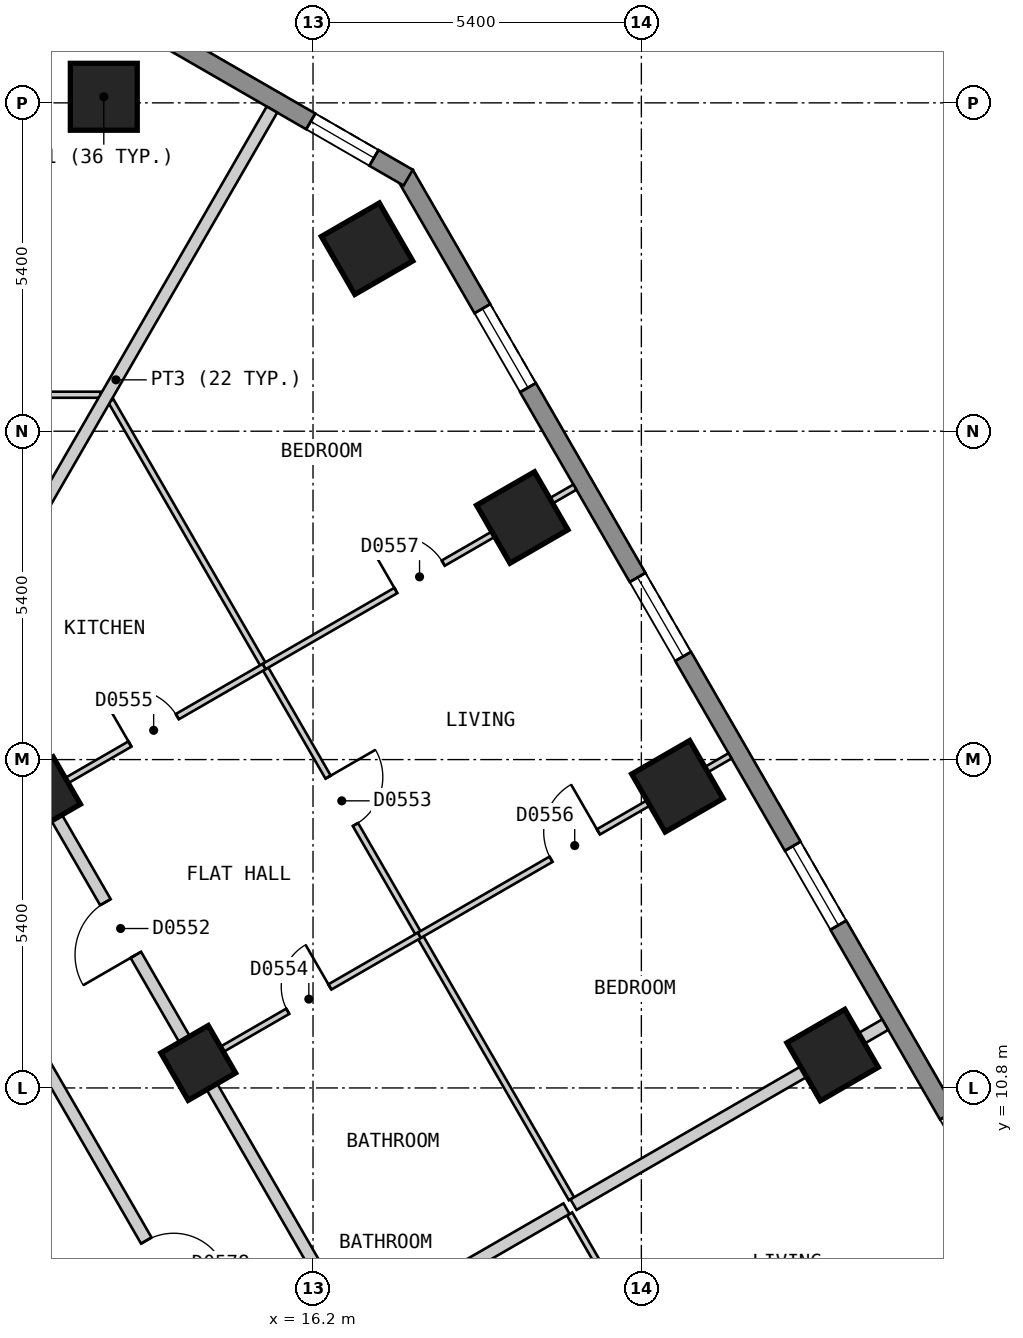
"""IFC4 building model, lengths in metres.
Left out: names, types, materials, properties, quantities, classifications, styles, units other than length and angle.
Written with IfcOpenShell. Run it as: python <this file> out.ifc"""

import sys

from ifc_helpers import new_model, si_unit, direction, frame, frame_2d, origin, origin_2d, place, context, subcontext, project, spatial, polyline, rectangle, outline, extrude, element, fill, save


model = new_model("IFC4")
c1 = context("Model", 3, precision=1e-05, world=origin(), true_north=direction((0.0, 1.0)))
c2 = subcontext(c1, "Body", "Model", "MODEL_VIEW")
j1 = project(units=[si_unit("LENGTHUNIT", "METRE"), si_unit("PLANEANGLEUNIT", "RADIAN")], contexts=[c1])
p1 = place(None, origin())
s1 = spatial("IfcSite", under=j1, at=p1, CompositionType="ELEMENT")
p2 = place(p1, origin())
s2 = spatial("IfcBuilding", under=s1, at=p2, CompositionType="ELEMENT")
p3 = place(p2, frame((0.0, 0.0, 44.4)))
s3 = spatial("IfcBuildingStorey", under=s2, at=p3, CompositionType="ELEMENT", Elevation=44.4)
for number, where, z_axis, x_axis in (
    (1, (12.759, 27.1, 0.0), (0.0, 0.0, 1.0), (-1.0, 0.0, 0.0)),
    (2, (24.745, 11.341, 0.0), (0.0, 0.0, 1.0), (-0.5, 0.866, 0.0)),
    (3, (22.193, 15.761, 0.0), (0.0, 0.0, 1.0), (-0.5, 0.866, 0.0)),
    (4, (19.641, 20.181, 0.0), (0.0, 0.0, 1.0), (-0.5, 0.866, 0.0)),
    (5, (17.089, 24.601, 0.0), (0.0, 0.0, 1.0), (-0.5, 0.866, 0.0)),
):
    element("IfcColumn", number, at=place(p3, frame(where, z_axis=z_axis, x_axis=x_axis)), inside=s3, PredefinedType="COLUMN", context=c2, shape_type="SweptSolid", body=[
        extrude(rectangle(XDim=1.1, YDim=1.1, at=origin_2d()), origin(), (0.0, 0.0, 1.0), 3.0),
    ])
for number, where, z_axis, x_axis in (
    (6, (14.312, 11.211, 0.0), (0.0, 0.0, 1.0), (-0.5, 0.866, 0.0)),
    (7, (11.76, 15.631, 0.0), (0.0, 0.0, 1.0), (-0.5, 0.866, 0.0)),
):
    element("IfcColumn", number, at=place(p3, frame(where, z_axis=z_axis, x_axis=x_axis)), inside=s3, PredefinedType="COLUMN", context=c2, shape_type="SweptSolid", body=[
        extrude(rectangle(XDim=0.9, YDim=0.9, at=origin_2d()), origin(), (0.0, 0.0, 1.0), 3.0),
    ])
p4 = place(p3, frame((31.22, 2.425, 0.0), z_axis=(0.0, 0.0, 1.0), x_axis=(-0.500001938803, 0.866024284413, 0.0)))
e8 = element("IfcWall", 8, at=p4, inside=s3, PredefinedType="SOLIDWALL", context=c2, shape_type="SweptSolid", body=[
    extrude(outline(polyline([(0.0, -0.15), (27.02, -0.15), (26.94, 0.15), (0.08, 0.15), (0.0, -0.15)])), origin(), (0.0, 0.0, 1.0), 2.7),
])
p5 = place(p4, frame((2.553, 0.0, 0.15)))
e9 = element("IfcOpeningElement", 9, at=p5, cuts=e8, PredefinedType="OPENING", context=c2, shape_type="SweptSolid", body=[
    extrude(rectangle(XDim=1.5, YDim=2.1, at=frame_2d((0.75, 1.05))), frame((0.0, 0.16, 0.0), z_axis=(0.0, -1.0, 0.0), x_axis=(1.0, 0.0, 0.0)), (0.0, 0.0, 1.0), 0.32),
])
p6 = place(p4, frame((7.657, 0.0, 0.15)))
e10 = element("IfcOpeningElement", 10, at=p6, cuts=e8, PredefinedType="OPENING", context=c2, shape_type="SweptSolid", body=[
    extrude(rectangle(XDim=1.5, YDim=2.1, at=frame_2d((0.75, 1.05))), frame((0.0, 0.16, 0.0), z_axis=(0.0, -1.0, 0.0), x_axis=(1.0, 0.0, 0.0)), (0.0, 0.0, 1.0), 0.32),
])
p7 = place(p4, frame((12.761, 0.0, 0.15)))
e11 = element("IfcOpeningElement", 11, at=p7, cuts=e8, PredefinedType="OPENING", context=c2, shape_type="SweptSolid", body=[
    extrude(rectangle(XDim=1.5, YDim=2.1, at=frame_2d((0.75, 1.05))), frame((0.0, 0.16, 0.0), z_axis=(0.0, -1.0, 0.0), x_axis=(1.0, 0.0, 0.0)), (0.0, 0.0, 1.0), 0.32),
])
p8 = place(p4, frame((17.865, 0.0, 0.15)))
e12 = element("IfcOpeningElement", 12, at=p8, cuts=e8, PredefinedType="OPENING", context=c2, shape_type="SweptSolid", body=[
    extrude(rectangle(XDim=1.5, YDim=2.1, at=frame_2d((0.75, 1.05))), frame((0.0, 0.16, 0.0), z_axis=(0.0, -1.0, 0.0), x_axis=(1.0, 0.0, 0.0)), (0.0, 0.0, 1.0), 0.32),
])
p9 = place(p4, frame((22.969, 0.0, 0.15)))
e13 = element("IfcOpeningElement", 13, at=p9, cuts=e8, PredefinedType="OPENING", context=c2, shape_type="SweptSolid", body=[
    extrude(rectangle(XDim=1.5, YDim=2.1, at=frame_2d((0.75, 1.05))), frame((0.0, 0.16, 0.0), z_axis=(0.0, -1.0, 0.0), x_axis=(1.0, 0.0, 0.0)), (0.0, 0.0, 1.0), 0.32),
])
p10 = place(p3, frame((17.765, 25.77, 0.0), z_axis=(0.0, 0.0, 1.0), x_axis=(-0.866010750942, 0.50002537861, 0.0)))
e14 = element("IfcWall", 14, at=p10, inside=s3, PredefinedType="SOLIDWALL", context=c2, shape_type="SweptSolid", body=[
    extrude(outline(polyline([(0.0, -0.15), (5.0, -0.15), (4.919, 0.15), (0.08, 0.15), (0.0, -0.15)])), origin(), (0.0, 0.0, 1.0), 2.7),
])
p11 = place(p10, frame((0.65, 0.0, 0.15)))
e15 = element("IfcOpeningElement", 15, at=p11, cuts=e14, PredefinedType="OPENING", context=c2, shape_type="SweptSolid", body=[
    extrude(rectangle(XDim=1.2, YDim=2.1, at=frame_2d((0.6, 1.05))), frame((0.0, 0.16, 0.0), z_axis=(0.0, -1.0, 0.0), x_axis=(1.0, 0.0, 0.0)), (0.0, 0.0, 1.0), 0.32),
])
p12 = place(p3, frame((9.18, 15.7, 0.0), z_axis=(0.0, 0.0, 1.0), x_axis=(0.500003652032, -0.866023295272, 0.0)))
e16 = element("IfcWall", 16, at=p12, inside=s3, PredefinedType="PARTITIONING", context=c2, shape_type="SweptSolid", body=[
    extrude(rectangle(XDim=18.012, YDim=0.2, at=frame_2d((9.006, 0.0))), origin(), (0.0, 0.0, 1.0), 2.7),
])
p13 = place(p12, frame((8.556, 0.0, 0.0)))
e17 = element("IfcOpeningElement", 17, at=p13, cuts=e16, PredefinedType="OPENING", context=c2, shape_type="SweptSolid", body=[
    extrude(rectangle(XDim=0.9, YDim=2.1, at=frame_2d((0.45, 1.05))), frame((0.0, 0.11, 0.0), z_axis=(0.0, -1.0, 0.0), x_axis=(1.0, 0.0, 0.0)), (0.0, 0.0, 1.0), 0.22),
])
p14 = place(p3, frame((10.45, 17.9, 0.0), z_axis=(0.0, 0.0, 1.0), x_axis=(0.500034352617, -0.866005569383, 0.0)))
e18 = element("IfcWall", 18, at=p14, inside=s3, PredefinedType="PARTITIONING", context=c2, shape_type="SweptSolid", body=[
    extrude(rectangle(XDim=20.553, YDim=0.2, at=frame_2d((10.276, 0.0))), origin(), (0.0, 0.0, 1.0), 2.7),
])
p15 = place(p14, frame((14.902, 0.0, 0.0)))
e19 = element("IfcOpeningElement", 19, at=p15, cuts=e18, PredefinedType="OPENING", context=c2, shape_type="SweptSolid", body=[
    extrude(rectangle(XDim=1.0, YDim=2.1, at=frame_2d((0.5, 1.05))), frame((0.0, 0.11, 0.0), z_axis=(0.0, -1.0, 0.0), x_axis=(1.0, 0.0, 0.0)), (0.0, 0.0, 1.0), 0.22),
])
p16 = place(p14, frame((4.671, 0.0, 0.0)))
e20 = element("IfcOpeningElement", 20, at=p16, cuts=e18, PredefinedType="OPENING", context=c2, shape_type="SweptSolid", body=[
    extrude(rectangle(XDim=1.0, YDim=2.1, at=frame_2d((0.5, 1.05))), frame((0.0, 0.11, 0.0), z_axis=(0.0, -1.0, 0.0), x_axis=(1.0, 0.0, 0.0)), (0.0, 0.0, 1.0), 0.22),
])
p17 = place(p3, frame((20.419, 8.728, 0.0), z_axis=(0.0, 0.0, 1.0), x_axis=(0.499958946799, -0.866049104564, 0.0)))
e21 = element("IfcWall", 21, at=p17, inside=s3, PredefinedType="PARTITIONING", context=c2, shape_type="SweptSolid", body=[
    extrude(rectangle(XDim=5.004, YDim=0.1, at=frame_2d((2.502, 0.0))), origin(), (0.0, 0.0, 1.0), 2.7),
])
p18 = place(p17, frame((1.978, 0.0, 0.0)))
e22 = element("IfcOpeningElement", 22, at=p18, cuts=e21, PredefinedType="OPENING", context=c2, shape_type="SweptSolid", body=[
    extrude(rectangle(XDim=0.9, YDim=2.1, at=frame_2d((0.45, 1.05))), frame((0.0, 0.06, 0.0), z_axis=(0.0, -1.0, 0.0), x_axis=(1.0, 0.0, 0.0)), (0.0, 0.0, 1.0), 0.12),
])
p19 = place(p3, frame((12.875, 22.1, 0.0), z_axis=(0.0, 0.0, 1.0), x_axis=(0.499994897061, -0.866028349948, 0.0)))
e23 = element("IfcWall", 23, at=p19, inside=s3, PredefinedType="PARTITIONING", context=c2, shape_type="SweptSolid", body=[
    extrude(rectangle(XDim=15.152, YDim=0.1, at=frame_2d((7.576, 0.0))), origin(), (0.0, 0.0, 1.0), 2.7),
])
p20 = place(p19, frame((7.146, 0.0, 0.0)))
e24 = element("IfcOpeningElement", 24, at=p20, cuts=e23, PredefinedType="OPENING", context=c2, shape_type="SweptSolid", body=[
    extrude(rectangle(XDim=0.9, YDim=2.1, at=frame_2d((0.45, 1.05))), frame((0.0, 0.06, 0.0), z_axis=(0.0, -1.0, 0.0), x_axis=(1.0, 0.0, 0.0)), (0.0, 0.0, 1.0), 0.12),
])
p21 = place(p3, frame((-2.453, 22.2, 0.0), z_axis=(0.0, 0.0, 1.0), x_axis=(1.0, 0.0, 0.0)))
e25 = element("IfcWall", 25, at=p21, inside=s3, PredefinedType="PARTITIONING", context=c2, shape_type="SweptSolid", body=[
    extrude(rectangle(XDim=15.155, YDim=0.1, at=frame_2d((7.577, 0.0))), origin(), (0.0, 0.0, 1.0), 2.7),
])
p22 = place(p21, frame((7.106, 0.0, 0.0)))
e26 = element("IfcOpeningElement", 26, at=p22, cuts=e25, PredefinedType="OPENING", context=c2, shape_type="SweptSolid", body=[
    extrude(rectangle(XDim=0.9, YDim=2.1, at=frame_2d((0.45, 1.05))), frame((0.0, 0.06, 0.0), z_axis=(0.0, -1.0, 0.0), x_axis=(1.0, 0.0, 0.0)), (0.0, 0.0, 1.0), 0.12),
])
p23 = place(p3, frame((11.847, 15.681, 0.0), z_axis=(0.0, 0.0, 1.0), x_axis=(0.865980278416, 0.500078151287, 0.0)))
e27 = element("IfcWall", 27, at=p23, inside=s3, PredefinedType="PARTITIONING", context=c2, shape_type="SweptSolid", body=[
    extrude(rectangle(XDim=4.099, YDim=0.1, at=frame_2d((2.05, 0.0))), origin(), (0.0, 0.0, 1.0), 2.7),
])
p24 = place(p23, frame((1.55, 0.0, 0.0)))
e28 = element("IfcOpeningElement", 28, at=p24, cuts=e27, PredefinedType="OPENING", context=c2, shape_type="SweptSolid", body=[
    extrude(rectangle(XDim=0.9, YDim=2.1, at=frame_2d((0.45, 1.05))), frame((0.0, 0.06, 0.0), z_axis=(0.0, -1.0, 0.0), x_axis=(1.0, 0.0, 0.0)), (0.0, 0.0, 1.0), 0.12),
])
p25 = place(p3, frame((14.399, 11.261, 0.0), z_axis=(0.0, 0.0, 1.0), x_axis=(0.865980278416, 0.500078151287, 0.0)))
e29 = element("IfcWall", 29, at=p25, inside=s3, PredefinedType="PARTITIONING", context=c2, shape_type="SweptSolid", body=[
    extrude(rectangle(XDim=4.099, YDim=0.1, at=frame_2d((2.05, 0.0))), origin(), (0.0, 0.0, 1.0), 2.7),
])
p26 = place(p25, frame((1.6, 0.0, 0.0)))
e30 = element("IfcOpeningElement", 30, at=p26, cuts=e29, PredefinedType="OPENING", context=c2, shape_type="SweptSolid", body=[
    extrude(rectangle(XDim=0.8, YDim=2.1, at=frame_2d((0.4, 1.05))), frame((0.0, 0.06, 0.0), z_axis=(0.0, -1.0, 0.0), x_axis=(1.0, 0.0, 0.0)), (0.0, 0.0, 1.0), 0.12),
])
p27 = place(p3, frame((10.393, 18.0, 0.0), z_axis=(0.0, 0.0, 1.0), x_axis=(0.499945497007, 0.866056868816, 0.0)))
e31 = element("IfcWall", 31, at=p27, inside=s3, PredefinedType="PARTITIONING", context=c2, shape_type="SweptSolid", body=[
    extrude(rectangle(XDim=10.265, YDim=0.2, at=frame_2d((5.132, 0.0))), origin(), (0.0, 0.0, 1.0), 2.7),
])
p28 = place(p3, frame((16.95, 6.841, 0.0), z_axis=(0.0, 0.0, 1.0), x_axis=(0.866031112038, 0.499990112884, 0.0)))
e32 = element("IfcWall", 32, at=p28, inside=s3, PredefinedType="PARTITIONING", context=c2, shape_type="SweptSolid", body=[
    extrude(rectangle(XDim=3.948, YDim=0.2, at=frame_2d((1.974, 0.0))), origin(), (0.0, 0.0, 1.0), 2.7),
])
p29 = place(p3, frame((20.484, 8.881, 0.0), z_axis=(0.0, 0.0, 1.0), x_axis=(0.866000821391, 0.500042575537, 0.0)))
e33 = element("IfcWall", 33, at=p29, inside=s3, PredefinedType="PARTITIONING", context=c2, shape_type="SweptSolid", body=[
    extrude(rectangle(XDim=5.919, YDim=0.2, at=frame_2d((2.96, 0.0))), origin(), (0.0, 0.0, 1.0), 2.7),
])
p30 = place(p3, frame((15.397, 17.731, 0.0), z_axis=(0.0, 0.0, 1.0), x_axis=(0.866052608538, 0.499952877023, 0.0)))
e34 = element("IfcWall", 34, at=p30, inside=s3, PredefinedType="PARTITIONING", context=c2, shape_type="SweptSolid", body=[
    extrude(rectangle(XDim=5.9, YDim=0.1, at=frame_2d((2.95, 0.0))), origin(), (0.0, 0.0, 1.0), 2.7),
])
p31 = place(p30, frame((2.5, 0.0, 0.0)))
e35 = element("IfcOpeningElement", 35, at=p31, cuts=e34, PredefinedType="OPENING", context=c2, shape_type="SweptSolid", body=[
    extrude(rectangle(XDim=0.9, YDim=2.1, at=frame_2d((0.45, 1.05))), frame((0.0, 0.06, 0.0), z_axis=(0.0, -1.0, 0.0), x_axis=(1.0, 0.0, 0.0)), (0.0, 0.0, 1.0), 0.12),
])
p32 = place(p3, frame((17.949, 13.311, 0.0), z_axis=(0.0, 0.0, 1.0), x_axis=(0.866052608538, 0.499952877023, 0.0)))
e36 = element("IfcWall", 36, at=p32, inside=s3, PredefinedType="PARTITIONING", context=c2, shape_type="SweptSolid", body=[
    extrude(rectangle(XDim=5.9, YDim=0.1, at=frame_2d((2.95, 0.0))), origin(), (0.0, 0.0, 1.0), 2.7),
])
p33 = place(p32, frame((2.5, 0.0, 0.0)))
e37 = element("IfcOpeningElement", 37, at=p33, cuts=e36, PredefinedType="OPENING", context=c2, shape_type="SweptSolid", body=[
    extrude(rectangle(XDim=0.9, YDim=2.1, at=frame_2d((0.45, 1.05))), frame((0.0, 0.06, 0.0), z_axis=(0.0, -1.0, 0.0), x_axis=(1.0, 0.0, 0.0)), (0.0, 0.0, 1.0), 0.12),
])
p34 = place(p7, origin())
e38 = element("IfcWindow", 38, at=p34, inside=s3, PartitioningType="SINGLE_PANEL", PredefinedType="WINDOW", context=c2, shape_type="SweptSolid", body=[
    extrude(rectangle(XDim=1.5, YDim=2.1, at=frame_2d((0.75, 1.05))), frame((0.0, 0.03, 0.0), z_axis=(0.0, -1.0, 0.0), x_axis=(1.0, 0.0, 0.0)), (0.0, 0.0, 1.0), 0.06),
])
fill(e11, e38)
p35 = place(p8, origin())
e39 = element("IfcWindow", 39, at=p35, inside=s3, PartitioningType="SINGLE_PANEL", PredefinedType="WINDOW", context=c2, shape_type="SweptSolid", body=[
    extrude(rectangle(XDim=1.5, YDim=2.1, at=frame_2d((0.75, 1.05))), frame((0.0, 0.03, 0.0), z_axis=(0.0, -1.0, 0.0), x_axis=(1.0, 0.0, 0.0)), (0.0, 0.0, 1.0), 0.06),
])
fill(e12, e39)
p36 = place(p9, origin())
e40 = element("IfcWindow", 40, at=p36, inside=s3, PartitioningType="SINGLE_PANEL", PredefinedType="WINDOW", context=c2, shape_type="SweptSolid", body=[
    extrude(rectangle(XDim=1.5, YDim=2.1, at=frame_2d((0.75, 1.05))), frame((0.0, 0.03, 0.0), z_axis=(0.0, -1.0, 0.0), x_axis=(1.0, 0.0, 0.0)), (0.0, 0.0, 1.0), 0.06),
])
fill(e13, e40)
p37 = place(p11, origin())
e41 = element("IfcWindow", 41, at=p37, inside=s3, PartitioningType="SINGLE_PANEL", PredefinedType="WINDOW", context=c2, shape_type="SweptSolid", body=[
    extrude(rectangle(XDim=1.2, YDim=2.1, at=frame_2d((0.6, 1.05))), frame((0.0, 0.03, 0.0), z_axis=(0.0, -1.0, 0.0), x_axis=(1.0, 0.0, 0.0)), (0.0, 0.0, 1.0), 0.06),
])
fill(e15, e41)
p38 = place(p16, origin())
e42 = element("IfcDoor", 42, at=p38, inside=s3, OperationType="SINGLE_SWING_RIGHT", PredefinedType="DOOR", context=c2, shape_type="SweptSolid", body=[
    extrude(rectangle(XDim=1.0, YDim=2.1, at=frame_2d((0.5, 1.05))), frame((0.0, 0.025, 0.0), z_axis=(0.0, -1.0, 0.0), x_axis=(1.0, 0.0, 0.0)), (0.0, 0.0, 1.0), 0.05),
])
fill(e20, e42)
p39 = place(p20, origin())
e43 = element("IfcDoor", 43, at=p39, inside=s3, OperationType="SINGLE_SWING_LEFT", PredefinedType="DOOR", context=c2, shape_type="SweptSolid", body=[
    extrude(rectangle(XDim=0.9, YDim=2.1, at=frame_2d((0.45, 1.05))), frame((0.0, 0.025, 0.0), z_axis=(0.0, -1.0, 0.0), x_axis=(1.0, 0.0, 0.0)), (0.0, 0.0, 1.0), 0.05),
])
fill(e24, e43)
p40 = place(p26, origin())
e44 = element("IfcDoor", 44, at=p40, inside=s3, OperationType="SINGLE_SWING_RIGHT", PredefinedType="DOOR", context=c2, shape_type="SweptSolid", body=[
    extrude(rectangle(XDim=0.8, YDim=2.1, at=frame_2d((0.4, 1.05))), frame((0.0, 0.025, 0.0), z_axis=(0.0, -1.0, 0.0), x_axis=(1.0, 0.0, 0.0)), (0.0, 0.0, 1.0), 0.05),
])
fill(e30, e44)
p41 = place(p24, origin())
e45 = element("IfcDoor", 45, at=p41, inside=s3, OperationType="SINGLE_SWING_LEFT", PredefinedType="DOOR", context=c2, shape_type="SweptSolid", body=[
    extrude(rectangle(XDim=0.9, YDim=2.1, at=frame_2d((0.45, 1.05))), frame((0.0, 0.025, 0.0), z_axis=(0.0, -1.0, 0.0), x_axis=(1.0, 0.0, 0.0)), (0.0, 0.0, 1.0), 0.05),
])
fill(e28, e45)
p42 = place(p33, origin())
e46 = element("IfcDoor", 46, at=p42, inside=s3, OperationType="SINGLE_SWING_RIGHT", PredefinedType="DOOR", context=c2, shape_type="SweptSolid", body=[
    extrude(rectangle(XDim=0.9, YDim=2.1, at=frame_2d((0.45, 1.05))), frame((0.0, 0.025, 0.0), z_axis=(0.0, -1.0, 0.0), x_axis=(1.0, 0.0, 0.0)), (0.0, 0.0, 1.0), 0.05),
])
fill(e37, e46)
p43 = place(p31, origin())
e47 = element("IfcDoor", 47, at=p43, inside=s3, OperationType="SINGLE_SWING_LEFT", PredefinedType="DOOR", context=c2, shape_type="SweptSolid", body=[
    extrude(rectangle(XDim=0.9, YDim=2.1, at=frame_2d((0.45, 1.05))), frame((0.0, 0.025, 0.0), z_axis=(0.0, -1.0, 0.0), x_axis=(1.0, 0.0, 0.0)), (0.0, 0.0, 1.0), 0.05),
])
fill(e35, e47)
p44 = place(p13, origin())
e48 = element("IfcDoor", 48, at=p44, inside=s3, OperationType="SINGLE_SWING_RIGHT", PredefinedType="DOOR", context=c2, shape_type="SweptSolid", body=[
    extrude(rectangle(XDim=0.9, YDim=2.1, at=frame_2d((0.45, 1.05))), frame((0.0, 0.025, 0.0), z_axis=(0.0, -1.0, 0.0), x_axis=(1.0, 0.0, 0.0)), (0.0, 0.0, 1.0), 0.05),
])
fill(e17, e48)
save(model, sys.argv[1])
